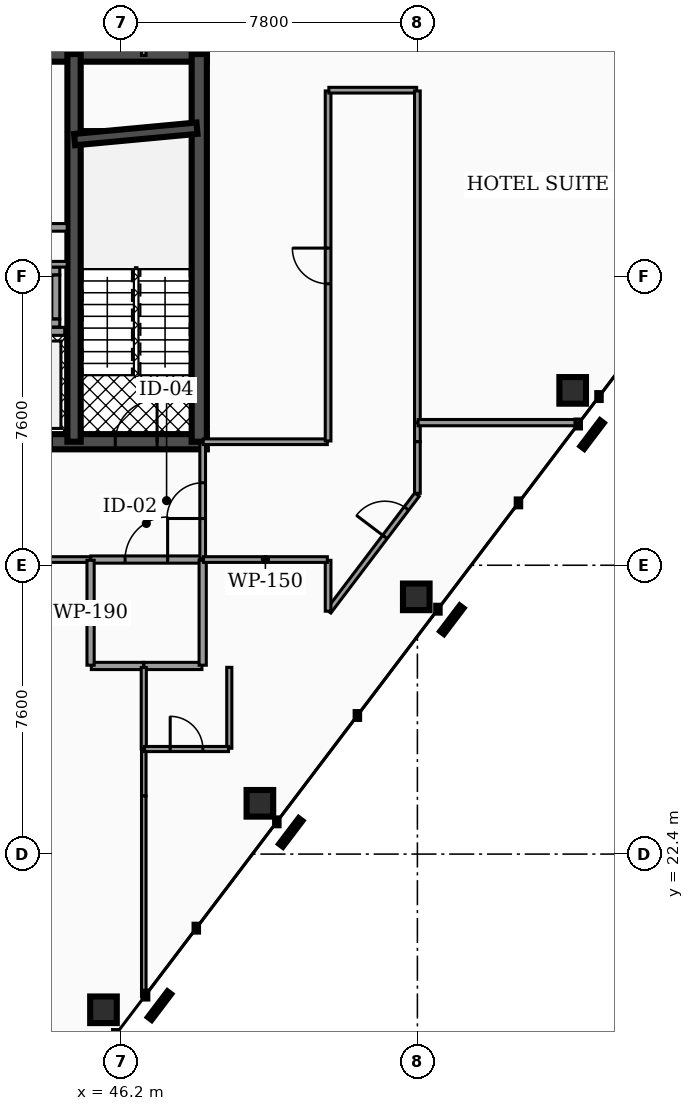
"""IFC4 building model, lengths in metres.
Left out: names, types, materials, properties, quantities, classifications, styles, units other than length and angle.
Written with IfcOpenShell. Run it as: python <this file> out.ifc"""

import sys

from ifc_helpers import new_model, si_unit, direction, frame, frame_2d, origin, origin_2d, place, context, subcontext, project, spatial, rectangle, hollow_rectangle, extrude, element, fill, save


model = new_model("IFC4")
c1 = context("Model", 3, precision=1e-05, world=origin(), true_north=direction((0.0, 1.0)))
c2 = subcontext(c1, "Body", "Model", "MODEL_VIEW")
j1 = project(units=[si_unit("LENGTHUNIT", "METRE"), si_unit("PLANEANGLEUNIT", "RADIAN")], contexts=[c1])
p1 = place(None, origin())
s1 = spatial("IfcSite", under=j1, at=p1, CompositionType="ELEMENT")
p2 = place(p1, origin())
s2 = spatial("IfcBuilding", under=s1, at=p2, CompositionType="ELEMENT")
p3 = place(p2, frame((0.0, 0.0, 164.56)))
s3 = spatial("IfcBuildingStorey", under=s2, at=p3, CompositionType="ELEMENT", Elevation=164.56)
p4 = place(p3, frame((28.4, 43.45, 0.0), z_axis=(0.0, 0.0, 1.0), x_axis=(1.0, 0.0, 0.0)))
e1 = element("IfcWall", 1, at=p4, inside=s3, PredefinedType="SHEAR", context=c2, shape_type="SweptSolid", body=[
    extrude(rectangle(XDim=20.06, YDim=0.4, at=frame_2d((10.03, 0.0))), origin(), (0.0, 0.0, 1.0), 3.5),
])
p5 = place(p3, frame((28.4, 33.25, 0.0), z_axis=(0.0, 0.0, 1.0), x_axis=(1.0, 0.0, 0.0)))
e2 = element("IfcWall", 2, at=p5, inside=s3, PredefinedType="SHEAR", context=c2, shape_type="SweptSolid", body=[
    extrude(rectangle(XDim=20.06, YDim=0.4, at=frame_2d((10.03, 0.0))), origin(), (0.0, 0.0, 1.0), 3.5),
])
p6 = place(p5, frame((4.03, 0.0, 0.0)))
e3 = element("IfcOpeningElement", 3, at=p6, cuts=e2, PredefinedType="OPENING", context=c2, shape_type="SweptSolid", body=[
    extrude(rectangle(XDim=1.1, YDim=2.15, at=frame_2d((0.55, 1.075))), frame((0.0, 0.21, 0.0), z_axis=(0.0, -1.0, 0.0), x_axis=(1.0, 0.0, 0.0)), (0.0, 0.0, 1.0), 0.42),
])
p7 = place(p5, frame((14.87, 0.0, 0.0)))
e4 = element("IfcOpeningElement", 4, at=p7, cuts=e2, PredefinedType="OPENING", context=c2, shape_type="SweptSolid", body=[
    extrude(rectangle(XDim=1.1, YDim=2.15, at=frame_2d((0.55, 1.075))), frame((0.0, 0.21, 0.0), z_axis=(0.0, -1.0, 0.0), x_axis=(1.0, 0.0, 0.0)), (0.0, 0.0, 1.0), 0.42),
])
p8 = place(p5, frame((5.95, 0.0, 0.0)))
e5 = element("IfcOpeningElement", 5, at=p8, cuts=e2, PredefinedType="OPENING", context=c2, shape_type="SweptSolid", body=[
    extrude(rectangle(XDim=1.0, YDim=2.1, at=frame_2d((0.5, 1.05))), frame((0.0, 0.21, 0.0), z_axis=(0.0, -1.0, 0.0), x_axis=(1.0, 0.0, 0.0)), (0.0, 0.0, 1.0), 0.42),
])
p9 = place(p5, frame((7.65, 0.0, 0.0)))
e6 = element("IfcOpeningElement", 6, at=p9, cuts=e2, PredefinedType="OPENING", context=c2, shape_type="SweptSolid", body=[
    extrude(rectangle(XDim=1.0, YDim=2.1, at=frame_2d((0.5, 1.05))), frame((0.0, 0.21, 0.0), z_axis=(0.0, -1.0, 0.0), x_axis=(1.0, 0.0, 0.0)), (0.0, 0.0, 1.0), 0.42),
])
p10 = place(p5, frame((1.31, 0.0, 0.0)))
e7 = element("IfcOpeningElement", 7, at=p10, cuts=e2, PredefinedType="OPENING", context=c2, shape_type="SweptSolid", body=[
    extrude(rectangle(XDim=1.1, YDim=2.2, at=frame_2d((0.55, 1.1))), frame((0.0, 0.21, 0.0), z_axis=(0.0, -1.0, 0.0), x_axis=(1.0, 0.0, 0.0)), (0.0, 0.0, 1.0), 0.42),
])
p11 = place(p5, frame((9.44, 0.0, 0.0)))
e8 = element("IfcOpeningElement", 8, at=p11, cuts=e2, PredefinedType="OPENING", context=c2, shape_type="SweptSolid", body=[
    extrude(rectangle(XDim=1.12, YDim=2.05, at=frame_2d((0.56, 1.025))), frame((0.0, 0.21, 0.0), z_axis=(0.0, -1.0, 0.0), x_axis=(1.0, 0.0, 0.0)), (0.0, 0.0, 1.0), 0.42),
])
p12 = place(p5, frame((17.65, 0.0, 0.0)))
e9 = element("IfcOpeningElement", 9, at=p12, cuts=e2, PredefinedType="OPENING", context=c2, shape_type="SweptSolid", body=[
    extrude(rectangle(XDim=1.1, YDim=2.2, at=frame_2d((0.55, 1.1))), frame((0.0, 0.21, 0.0), z_axis=(0.0, -1.0, 0.0), x_axis=(1.0, 0.0, 0.0)), (0.0, 0.0, 1.0), 0.42),
])
p13 = place(p3, frame((44.965, 33.25, 0.0), z_axis=(0.0, 0.0, 1.0), x_axis=(0.0, 1.0, 0.0)))
e10 = element("IfcWall", 10, at=p13, inside=s3, PredefinedType="SHEAR", context=c2, shape_type="SweptSolid", body=[
    extrude(rectangle(XDim=10.2, YDim=0.35, at=frame_2d((5.1, 0.0))), origin(), (0.0, 0.0, 1.0), 3.5),
])
p14 = place(p3, frame((48.26, 33.25, 0.0), z_axis=(0.0, 0.0, 1.0), x_axis=(0.0, 1.0, 0.0)))
e11 = element("IfcWall", 11, at=p14, inside=s3, PredefinedType="SHEAR", context=c2, shape_type="SweptSolid", body=[
    extrude(rectangle(XDim=10.2, YDim=0.4, at=frame_2d((5.1, 0.0))), origin(), (0.0, 0.0, 1.0), 3.5),
])
p15 = place(p3, frame((44.98, 41.2, 0.0), z_axis=(0.0, 0.0, 1.0), x_axis=(0.995686468965, 0.09278176286, 0.0)))
e12 = element("IfcWall", 12, at=p15, inside=s3, PredefinedType="SHEAR", context=c2, shape_type="SweptSolid", body=[
    extrude(rectangle(XDim=3.234, YDim=0.3, at=frame_2d((1.617, 0.0))), origin(), (0.0, 0.0, 1.0), 3.5),
])
for number, where, z_axis, x_axis in (
    (13, (45.74, 18.303, 0.0), (0.0, 0.0, 1.0), (1.0, 0.0, 0.0)),
    (14, (49.855, 23.736, 0.0), (0.0, 0.0, 1.0), (1.0, 0.0, 0.0)),
    (15, (53.971, 29.168, 0.0), (0.0, 0.0, 1.0), (1.0, 0.0, 0.0)),
    (16, (58.086, 34.601, 0.0), (0.0, 0.0, 1.0), (1.0, 0.0, 0.0)),
):
    element("IfcColumn", number, at=place(p3, frame(where, z_axis=z_axis, x_axis=x_axis)), inside=s3, PredefinedType="COLUMN", context=c2, shape_type="SweptSolid", body=[
        extrude(hollow_rectangle(XDim=0.7, YDim=0.7, WallThickness=0.035, at=origin_2d()), origin(), (0.0, 0.0, 1.0), 3.5),
    ])
p16 = place(p3, frame((42.92, 36.155, 0.0), z_axis=(0.0, 0.0, 1.0), x_axis=(1.0, 0.0, 0.0)))
e17 = element("IfcWall", 17, at=p16, inside=s3, PredefinedType="SOLIDWALL", context=c2, shape_type="SweptSolid", body=[
    extrude(rectangle(XDim=1.8, YDim=0.21, at=frame_2d((0.9, 0.0))), origin(), (0.0, 0.0, 1.0), 2.472),
])
for number, where, z_axis, x_axis in (
    (18, (42.99, 36.375, 0.0), (0.0, 0.0, 1.0), (1.0, 0.0, 0.0)),
    (19, (42.99, 37.745, 0.0), (0.0, 0.0, 1.0), (1.0, 0.0, 0.0)),
):
    element("IfcWall", number, at=place(p3, frame(where, z_axis=z_axis, x_axis=x_axis)), inside=s3, PredefinedType="SOLIDWALL", context=c2, shape_type="SweptSolid", body=[
        extrude(rectangle(XDim=1.6, YDim=0.21, at=frame_2d((0.8, 0.0))), origin(), (0.0, 0.0, 1.0), 3.5),
    ])
p17 = place(p3, frame((44.485, 36.485, 0.0), z_axis=(0.0, 0.0, 1.0), x_axis=(0.0, 1.0, 0.0)))
e20 = element("IfcWall", 20, at=p17, inside=s3, PredefinedType="SOLIDWALL", context=c2, shape_type="SweptSolid", body=[
    extrude(rectangle(XDim=1.15, YDim=0.21, at=frame_2d((0.575, 0.0))), origin(), (0.0, 0.0, 1.0), 3.5),
])
p18 = place(p3, frame((39.25, 38.89, 0.0), z_axis=(0.0, 0.0, 1.0), x_axis=(1.0, 0.0, 0.0)))
e21 = element("IfcWall", 21, at=p18, inside=s3, PredefinedType="PARTITIONING", context=c2, shape_type="SweptSolid", body=[
    extrude(rectangle(XDim=5.535, YDim=0.2, at=frame_2d((2.768, 0.0))), origin(), (0.0, 0.0, 1.0), 2.457),
])
p19 = place(p18, frame((2.327, 0.0, 0.0)))
e22 = element("IfcOpeningElement", 22, at=p19, cuts=e21, PredefinedType="OPENING", context=c2, shape_type="SweptSolid", body=[
    extrude(rectangle(XDim=0.88, YDim=2.05, at=frame_2d((0.44, 1.025))), frame((0.0, 0.11, 0.0), z_axis=(0.0, -1.0, 0.0), x_axis=(1.0, 0.0, 0.0)), (0.0, 0.0, 1.0), 0.22),
])
p20 = place(p3, frame((41.62, 37.92, 0.0), z_axis=(0.0, 0.0, 1.0), x_axis=(1.0, 0.0, 0.0)))
e23 = element("IfcWall", 23, at=p20, inside=s3, PredefinedType="PARTITIONING", context=c2, shape_type="SweptSolid", body=[
    extrude(rectangle(XDim=3.165, YDim=0.15, at=frame_2d((1.583, 0.0))), origin(), (0.0, 0.0, 1.0), 2.457),
])
p21 = place(p20, frame((0.312, 0.0, 0.0)))
e24 = element("IfcOpeningElement", 24, at=p21, cuts=e23, PredefinedType="OPENING", context=c2, shape_type="SweptSolid", body=[
    extrude(rectangle(XDim=0.94, YDim=2.05, at=frame_2d((0.47, 1.025))), frame((0.0, 0.085, 0.0), z_axis=(0.0, -1.0, 0.0), x_axis=(1.0, 0.0, 0.0)), (0.0, 0.0, 1.0), 0.17),
])
p22 = place(p3, frame((45.405, 30.15, 0.0), z_axis=(0.0, 0.0, 1.0), x_axis=(1.0, 0.0, 0.0)))
e25 = element("IfcWall", 25, at=p22, inside=s3, PredefinedType="PARTITIONING", context=c2, shape_type="SweptSolid", body=[
    extrude(rectangle(XDim=2.925, YDim=0.19, at=frame_2d((1.462, 0.0))), origin(), (0.0, 0.0, 1.0), 2.457),
])
p23 = place(p22, frame((0.903, 0.0, 0.0)))
e26 = element("IfcOpeningElement", 26, at=p23, cuts=e25, PredefinedType="OPENING", context=c2, shape_type="SweptSolid", body=[
    extrude(rectangle(XDim=1.12, YDim=2.05, at=frame_2d((0.56, 1.025))), frame((0.0, 0.105, 0.0), z_axis=(0.0, -1.0, 0.0), x_axis=(1.0, 0.0, 0.0)), (0.0, 0.0, 1.0), 0.21),
])
p24 = place(p3, frame((48.35, 30.17, 0.0), z_axis=(0.0, 0.0, 1.0), x_axis=(0.0, 1.0, 0.0)))
e27 = element("IfcWall", 27, at=p24, inside=s3, PredefinedType="PARTITIONING", context=c2, shape_type="SweptSolid", body=[
    extrude(rectangle(XDim=3.06, YDim=0.15, at=frame_2d((1.53, 0.0))), origin(), (0.0, 0.0, 1.0), 2.457),
])
p25 = place(p24, frame((1.06, 0.0, 0.0)))
e28 = element("IfcOpeningElement", 28, at=p25, cuts=e27, PredefinedType="OPENING", context=c2, shape_type="SweptSolid", body=[
    extrude(rectangle(XDim=0.94, YDim=2.05, at=frame_2d((0.47, 1.025))), frame((0.0, 0.085, 0.0), z_axis=(0.0, -1.0, 0.0), x_axis=(1.0, 0.0, 0.0)), (0.0, 0.0, 1.0), 0.17),
])
p26 = place(p3, frame((35.385, 30.15, 0.0), z_axis=(0.0, 0.0, 1.0), x_axis=(1.0, 0.0, 0.0)))
e29 = element("IfcWall", 29, at=p26, inside=s3, PredefinedType="PARTITIONING", context=c2, shape_type="SweptSolid", body=[
    extrude(rectangle(XDim=10.01, YDim=0.15, at=frame_2d((5.005, 0.0))), origin(), (0.0, 0.0, 1.0), 2.457),
])
p27 = place(p26, frame((7.935, 0.0, 0.0)))
e30 = element("IfcOpeningElement", 30, at=p27, cuts=e29, PredefinedType="OPENING", context=c2, shape_type="SweptSolid", body=[
    extrude(rectangle(XDim=0.94, YDim=2.05, at=frame_2d((0.47, 1.025))), frame((0.0, 0.085, 0.0), z_axis=(0.0, -1.0, 0.0), x_axis=(1.0, 0.0, 0.0)), (0.0, 0.0, 1.0), 0.17),
])
p28 = place(p3, frame((45.42, 27.35, 0.0), z_axis=(0.0, 0.0, 1.0), x_axis=(1.0, 0.0, 0.0)))
e31 = element("IfcWall", 31, at=p28, inside=s3, PredefinedType="PARTITIONING", context=c2, shape_type="SweptSolid", body=[
    extrude(rectangle(XDim=1.375, YDim=0.19, at=frame_2d((0.688, 0.0))), origin(), (0.0, 0.0, 1.0), 2.457),
])
p29 = place(p3, frame((45.4, 27.37, 0.0), z_axis=(0.0, 0.0, 1.0), x_axis=(0.0, 1.0, 0.0)))
e32 = element("IfcWall", 32, at=p29, inside=s3, PredefinedType="PARTITIONING", context=c2, shape_type="SweptSolid", body=[
    extrude(rectangle(XDim=2.76, YDim=0.19, at=frame_2d((1.38, 0.0))), origin(), (0.0, 0.0, 1.0), 2.457),
])
p30 = place(p3, frame((46.805, 27.35, 0.0), z_axis=(0.0, 0.0, 1.0), x_axis=(1.0, 0.0, 0.0)))
e33 = element("IfcWall", 33, at=p30, inside=s3, PredefinedType="PARTITIONING", context=c2, shape_type="SweptSolid", body=[
    extrude(rectangle(XDim=1.525, YDim=0.19, at=frame_2d((0.763, 0.0))), origin(), (0.0, 0.0, 1.0), 2.457),
])
p31 = place(p3, frame((48.35, 27.37, 0.0), z_axis=(0.0, 0.0, 1.0), x_axis=(0.0, 1.0, 0.0)))
e34 = element("IfcWall", 34, at=p31, inside=s3, PredefinedType="PARTITIONING", context=c2, shape_type="SweptSolid", body=[
    extrude(rectangle(XDim=2.76, YDim=0.19, at=frame_2d((1.38, 0.0))), origin(), (0.0, 0.0, 1.0), 2.457),
])
p32 = place(p3, frame((54.0, 33.25, 0.0), z_axis=(0.0, 0.0, 1.0), x_axis=(0.0, 1.0, 0.0)))
e35 = element("IfcWall", 35, at=p32, inside=s3, PredefinedType="PARTITIONING", context=c2, shape_type="SweptSolid", body=[
    extrude(rectangle(XDim=0.498, YDim=0.15, at=frame_2d((0.249, 0.0))), origin(), (0.0, 0.0, 1.0), 2.457),
])
p33 = place(p3, frame((54.0, 31.894, 0.0), z_axis=(0.0, 0.0, 1.0), x_axis=(0.0, 1.0, 0.0)))
e36 = element("IfcWall", 36, at=p33, inside=s3, PredefinedType="PARTITIONING", context=c2, shape_type="SweptSolid", body=[
    extrude(rectangle(XDim=1.356, YDim=0.15, at=frame_2d((0.678, 0.0))), origin(), (0.0, 0.0, 1.0), 2.457),
])
p34 = place(p3, frame((51.662, 28.787, 0.0), z_axis=(0.0, 0.0, 1.0), x_axis=(0.603806431354, 0.797130976349, 0.0)))
e37 = element("IfcWall", 37, at=p34, inside=s3, PredefinedType="PARTITIONING", context=c2, shape_type="SweptSolid", body=[
    extrude(rectangle(XDim=3.852, YDim=0.15, at=frame_2d((1.926, 0.0))), origin(), (0.0, 0.0, 1.0), 2.457),
])
p35 = place(p34, frame((2.456, 0.0, 0.0)))
e38 = element("IfcOpeningElement", 38, at=p35, cuts=e37, PredefinedType="OPENING", context=c2, shape_type="SweptSolid", body=[
    extrude(rectangle(XDim=0.94, YDim=2.05, at=frame_2d((0.47, 1.025))), frame((0.0, 0.085, 0.0), z_axis=(0.0, -1.0, 0.0), x_axis=(1.0, 0.0, 0.0)), (0.0, 0.0, 1.0), 0.17),
])
p36 = place(p3, frame((51.65, 28.792, 0.0), z_axis=(0.0, 0.0, 1.0), x_axis=(0.0, 1.0, 0.0)))
e39 = element("IfcWall", 39, at=p36, inside=s3, PredefinedType="PARTITIONING", context=c2, shape_type="SweptSolid", body=[
    extrude(rectangle(XDim=1.338, YDim=0.15, at=frame_2d((0.669, 0.0))), origin(), (0.0, 0.0, 1.0), 2.457),
])
p37 = place(p3, frame((48.37, 30.15, 0.0), z_axis=(0.0, 0.0, 1.0), x_axis=(1.0, 0.0, 0.0)))
e40 = element("IfcWall", 40, at=p37, inside=s3, PredefinedType="PARTITIONING", context=c2, shape_type="SweptSolid", body=[
    extrude(rectangle(XDim=3.26, YDim=0.15, at=frame_2d((1.63, 0.0))), origin(), (0.0, 0.0, 1.0), 2.457),
])
p38 = place(p3, frame((48.365, 33.25, 0.0), z_axis=(0.0, 0.0, 1.0), x_axis=(1.0, 0.0, 0.0)))
e41 = element("IfcWall", 41, at=p38, inside=s3, PredefinedType="PARTITIONING", context=c2, shape_type="SweptSolid", body=[
    extrude(rectangle(XDim=3.265, YDim=0.15, at=frame_2d((1.632, 0.0))), origin(), (0.0, 0.0, 1.0), 2.457),
])
p39 = place(p3, frame((51.65, 33.27, 0.0), z_axis=(0.0, 0.0, 1.0), x_axis=(0.0, 1.0, 0.0)))
e42 = element("IfcWall", 42, at=p39, inside=s3, PredefinedType="PARTITIONING", context=c2, shape_type="SweptSolid", body=[
    extrude(rectangle(XDim=9.21, YDim=0.15, at=frame_2d((4.605, 0.0))), origin(), (0.0, 0.0, 1.0), 2.457),
])
p40 = place(p39, frame((4.135, 0.0, 0.0)))
e43 = element("IfcOpeningElement", 43, at=p40, cuts=e42, PredefinedType="OPENING", context=c2, shape_type="SweptSolid", body=[
    extrude(rectangle(XDim=0.94, YDim=2.05, at=frame_2d((0.47, 1.025))), frame((0.0, 0.085, 0.0), z_axis=(0.0, -1.0, 0.0), x_axis=(1.0, 0.0, 0.0)), (0.0, 0.0, 1.0), 0.17),
])
p41 = place(p3, frame((51.67, 42.5, 0.0), z_axis=(0.0, 0.0, 1.0), x_axis=(1.0, 0.0, 0.0)))
e44 = element("IfcWall", 44, at=p41, inside=s3, PredefinedType="PARTITIONING", context=c2, shape_type="SweptSolid", body=[
    extrude(rectangle(XDim=2.31, YDim=0.15, at=frame_2d((1.155, 0.0))), origin(), (0.0, 0.0, 1.0), 2.457),
])
p42 = place(p3, frame((54.0, 33.758, 0.0), z_axis=(0.0, 0.0, 1.0), x_axis=(0.0, 1.0, 0.0)))
e45 = element("IfcWall", 45, at=p42, inside=s3, PredefinedType="PARTITIONING", context=c2, shape_type="SweptSolid", body=[
    extrude(rectangle(XDim=8.722, YDim=0.15, at=frame_2d((4.361, 0.0))), origin(), (0.0, 0.0, 1.0), 2.457),
])
p43 = place(p3, frame((46.8, 23.932, 0.0), z_axis=(0.0, 0.0, 1.0), x_axis=(0.0, 1.0, 0.0)))
e46 = element("IfcWall", 46, at=p43, inside=s3, PredefinedType="PARTITIONING", context=c2, shape_type="SweptSolid", body=[
    extrude(rectangle(XDim=1.228, YDim=0.12, at=frame_2d((0.614, 0.0))), origin(), (0.0, 0.0, 1.0), 2.457),
])
p44 = place(p3, frame((46.8, 18.642, 0.0), z_axis=(0.0, 0.0, 1.0), x_axis=(0.0, 1.0, 0.0)))
e47 = element("IfcWall", 47, at=p44, inside=s3, PredefinedType="PARTITIONING", context=c2, shape_type="SweptSolid", body=[
    extrude(rectangle(XDim=5.29, YDim=0.12, at=frame_2d((2.645, 0.0))), origin(), (0.0, 0.0, 1.0), 2.457),
])
p45 = place(p3, frame((46.8, 25.169, 0.0), z_axis=(0.0, 0.0, 1.0), x_axis=(0.0, 1.0, 0.0)))
e48 = element("IfcWall", 48, at=p45, inside=s3, PredefinedType="PARTITIONING", context=c2, shape_type="SweptSolid", body=[
    extrude(rectangle(XDim=2.14, YDim=0.135, at=frame_2d((1.07, 0.0))), origin(), (0.0, 0.0, 1.0), 2.457),
])
p46 = place(p3, frame((46.8, 43.415, 0.0), z_axis=(0.0, 0.0, 1.0), x_axis=(0.0, 1.0, 0.0)))
e49 = element("IfcWall", 49, at=p46, inside=s3, PredefinedType="PARTITIONING", context=c2, shape_type="SweptSolid", body=[
    extrude(rectangle(XDim=5.409, YDim=0.12, at=frame_2d((2.705, 0.0))), origin(), (0.0, 0.0, 1.0), 2.457),
])
p47 = place(p3, frame((49.05, 25.184, 0.0), z_axis=(0.0, 0.0, 1.0), x_axis=(0.0, 1.0, 0.0)))
e50 = element("IfcWall", 50, at=p47, inside=s3, PredefinedType="PARTITIONING", context=c2, shape_type="SweptSolid", body=[
    extrude(rectangle(XDim=2.13, YDim=0.135, at=frame_2d((1.065, 0.0))), origin(), (0.0, 0.0, 1.0), 2.457),
])
p48 = place(p3, frame((46.82, 25.164, 0.0), z_axis=(0.0, 0.0, 1.0), x_axis=(1.0, 0.0, 0.0)))
e51 = element("IfcWall", 51, at=p48, inside=s3, PredefinedType="PARTITIONING", context=c2, shape_type="SweptSolid", body=[
    extrude(rectangle(XDim=2.21, YDim=0.135, at=frame_2d((1.105, 0.0))), origin(), (0.0, 0.0, 1.0), 2.457),
])
p49 = place(p48, frame((0.675, 0.0, 0.0)))
e52 = element("IfcOpeningElement", 52, at=p49, cuts=e51, PredefinedType="OPENING", context=c2, shape_type="SweptSolid", body=[
    extrude(rectangle(XDim=0.86, YDim=2.05, at=frame_2d((0.43, 1.025))), frame((0.0, 0.077, 0.0), z_axis=(0.0, -1.0, 0.0), x_axis=(1.0, 0.0, 0.0)), (0.0, 0.0, 1.0), 0.155),
])
p50 = place(p3, frame((54.02, 33.753, 0.0), z_axis=(0.0, 0.0, 1.0), x_axis=(1.0, 0.0, 0.0)))
e53 = element("IfcWall", 53, at=p50, inside=s3, PredefinedType="PARTITIONING", context=c2, shape_type="SweptSolid", body=[
    extrude(rectangle(XDim=4.224, YDim=0.165, at=frame_2d((2.112, 0.0))), origin(), (0.0, 0.0, 1.0), 2.457),
])
p51 = place(p12, origin())
e54 = element("IfcDoor", 54, at=p51, inside=s3, OperationType="SINGLE_SWING_RIGHT", PredefinedType="DOOR", context=c2, shape_type="SweptSolid", body=[
    extrude(rectangle(XDim=1.1, YDim=2.2, at=frame_2d((0.55, 1.1))), frame((0.0, 0.025, 0.0), z_axis=(0.0, -1.0, 0.0), x_axis=(1.0, 0.0, 0.0)), (0.0, 0.0, 1.0), 0.05),
])
fill(e9, e54)
p52 = place(p23, origin())
e55 = element("IfcDoor", 55, at=p52, inside=s3, OperationType="SINGLE_SWING_RIGHT", PredefinedType="DOOR", context=c2, shape_type="SweptSolid", body=[
    extrude(rectangle(XDim=1.12, YDim=2.05, at=frame_2d((0.56, 1.025))), frame((0.0, 0.025, 0.0), z_axis=(0.0, -1.0, 0.0), x_axis=(1.0, 0.0, 0.0)), (0.0, 0.0, 1.0), 0.05),
])
fill(e26, e55)
p53 = place(p25, origin())
e56 = element("IfcDoor", 56, at=p53, inside=s3, OperationType="SINGLE_SWING_LEFT", PredefinedType="DOOR", context=c2, shape_type="SweptSolid", body=[
    extrude(rectangle(XDim=0.94, YDim=2.05, at=frame_2d((0.47, 1.025))), frame((0.0, 0.025, 0.0), z_axis=(0.0, -1.0, 0.0), x_axis=(1.0, 0.0, 0.0)), (0.0, 0.0, 1.0), 0.05),
])
fill(e28, e56)
p54 = place(p35, origin())
e57 = element("IfcDoor", 57, at=p54, inside=s3, OperationType="SINGLE_SWING_LEFT", PredefinedType="DOOR", context=c2, shape_type="SweptSolid", body=[
    extrude(rectangle(XDim=0.94, YDim=2.05, at=frame_2d((0.47, 1.025))), frame((0.0, 0.025, 0.0), z_axis=(0.0, -1.0, 0.0), x_axis=(1.0, 0.0, 0.0)), (0.0, 0.0, 1.0), 0.05),
])
fill(e38, e57)
p55 = place(p40, origin())
e58 = element("IfcDoor", 58, at=p55, inside=s3, OperationType="SINGLE_SWING_RIGHT", PredefinedType="DOOR", context=c2, shape_type="SweptSolid", body=[
    extrude(rectangle(XDim=0.94, YDim=2.05, at=frame_2d((0.47, 1.025))), frame((0.0, 0.025, 0.0), z_axis=(0.0, -1.0, 0.0), x_axis=(1.0, 0.0, 0.0)), (0.0, 0.0, 1.0), 0.05),
])
fill(e43, e58)
p56 = place(p49, origin())
e59 = element("IfcDoor", 59, at=p56, inside=s3, OperationType="SINGLE_SWING_LEFT", PredefinedType="DOOR", context=c2, shape_type="SweptSolid", body=[
    extrude(rectangle(XDim=0.86, YDim=2.05, at=frame_2d((0.43, 1.025))), frame((0.0, 0.025, 0.0), z_axis=(0.0, -1.0, 0.0), x_axis=(1.0, 0.0, 0.0)), (0.0, 0.0, 1.0), 0.05),
])
fill(e52, e59)
save(model, sys.argv[1])
